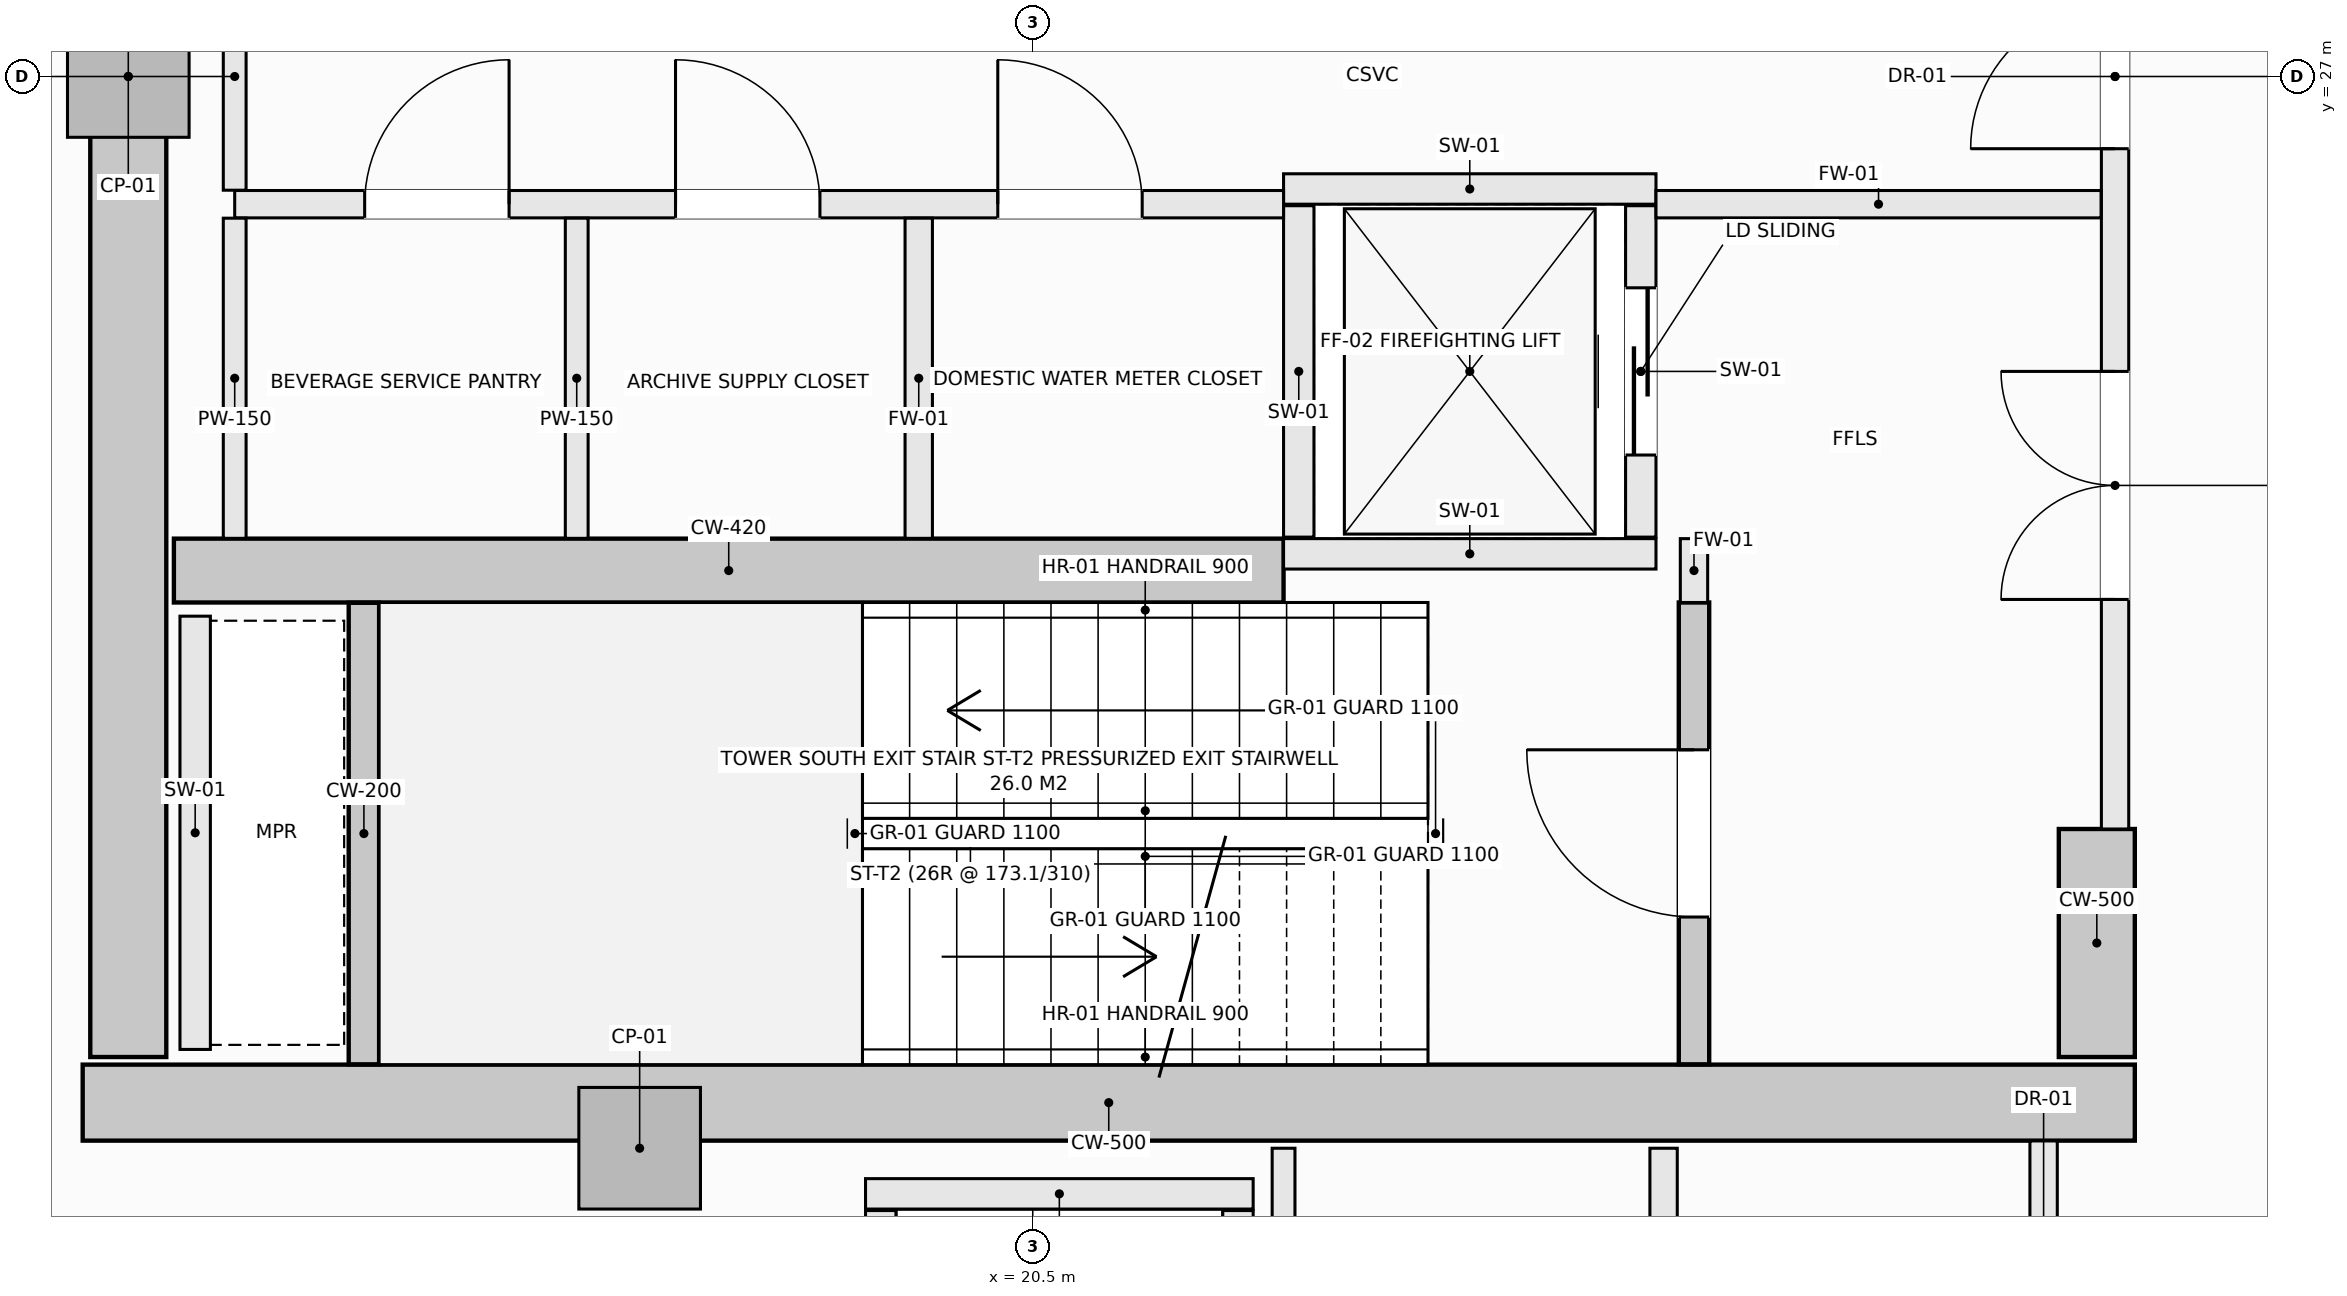
"""IFC4 building model, lengths in metres.
Left out: names, types, materials, properties, quantities, classifications, styles, units other than length and angle.
Written with IfcOpenShell. Run it as: python <this file> out.ifc"""

import sys

from ifc_helpers import new_model, si_unit, direction, frame, frame_2d, origin, origin_2d, place, context, subcontext, project, spatial, rectangle, extrude, element, fill, save


model = new_model("IFC4")
c1 = context("Model", 3, precision=1e-05, world=origin(), true_north=direction((0.0, 1.0)))
c2 = subcontext(c1, "Body", "Model", "MODEL_VIEW")
j1 = project(units=[si_unit("LENGTHUNIT", "METRE"), si_unit("PLANEANGLEUNIT", "RADIAN")], contexts=[c1])
p1 = place(None, origin())
s1 = spatial("IfcSite", under=j1, at=p1, CompositionType="ELEMENT")
p2 = place(p1, origin())
s2 = spatial("IfcBuilding", under=s1, at=p2, CompositionType="ELEMENT")
p3 = place(p2, frame((0.0, 0.0, 191.9)))
s3 = spatial("IfcBuildingStorey", under=s2, at=p3, CompositionType="ELEMENT", Elevation=191.9)
p4 = place(p3, frame((14.25, 20.25, -0.28), z_axis=(0.0, 0.0, 1.0), x_axis=(1.0, 0.0, 0.0)))
e1 = element("IfcWall", 1, at=p4, inside=s3, PredefinedType="SHEAR", context=c2, shape_type="SweptSolid", body=[
    extrude(rectangle(XDim=13.5, YDim=0.5, at=frame_2d((6.75, 0.0))), origin(), (0.0, 0.0, 1.0), 4.51),
])
p5 = place(p3, frame((14.55, 20.55, -0.28), z_axis=(0.0, 0.0, 1.0), x_axis=(0.0, 1.0, 0.0)))
e2 = element("IfcWall", 2, at=p5, inside=s3, PredefinedType="SHEAR", context=c2, shape_type="SweptSolid", body=[
    extrude(rectangle(XDim=12.9, YDim=0.5, at=frame_2d((6.45, 0.0))), origin(), (0.0, 0.0, 1.0), 4.51),
])
p6 = place(p3, frame((27.5, 20.55, -0.28), z_axis=(0.0, 0.0, 1.0), x_axis=(0.0, 1.0, 0.0)))
e3 = element("IfcWall", 3, at=p6, inside=s3, PredefinedType="SHEAR", context=c2, shape_type="SweptSolid", body=[
    extrude(rectangle(XDim=1.5, YDim=0.5, at=frame_2d((0.75, 0.0))), origin(), (0.0, 0.0, 1.0), 4.51),
])
p7 = place(p3, frame((14.85, 23.75, -0.28), z_axis=(0.0, 0.0, 1.0), x_axis=(1.0, 0.0, 0.0)))
e4 = element("IfcWall", 4, at=p7, inside=s3, PredefinedType="SHEAR", context=c2, shape_type="SweptSolid", body=[
    extrude(rectangle(XDim=7.3, YDim=0.42, at=frame_2d((3.65, 0.0))), origin(), (0.0, 0.0, 1.0), 4.51),
])
for number, where, z_axis, x_axis in (
    (5, (14.55, 27.0, -0.28), (0.0, 0.0, 1.0), (1.0, 0.0, 0.0)),
    (6, (17.914, 19.95, -0.28), (0.0, 0.0, 1.0), (1.0, 0.0, 0.0)),
):
    element("IfcColumn", number, at=place(p3, frame(where, z_axis=z_axis, x_axis=x_axis)), inside=s3, PredefinedType="PILASTER", context=c2, shape_type="SweptSolid", body=[
        extrude(rectangle(XDim=0.8, YDim=0.8, at=origin_2d()), origin(), (0.0, 0.0, 1.0), 4.51),
    ])
p8 = place(p3, frame((24.85, 20.502, -0.28), z_axis=(0.0, 0.0, 1.0), x_axis=(0.0, 1.0, 0.0)))
e7 = element("IfcWall", 7, at=p8, inside=s3, PredefinedType="SHEAR", context=c2, shape_type="SweptSolid", body=[
    extrude(rectangle(XDim=3.038, YDim=0.2, at=frame_2d((1.519, 0.0))), origin(), (0.0, 0.0, 1.0), 4.51),
])
p9 = place(p8, frame((0.969, 0.0, 0.28)))
e8 = element("IfcOpeningElement", 8, at=p9, cuts=e7, PredefinedType="OPENING", context=c2, shape_type="SweptSolid", body=[
    extrude(rectangle(XDim=1.1, YDim=2.15, at=frame_2d((0.55, 1.075))), frame((0.0, 0.11, 0.0), z_axis=(0.0, -1.0, 0.0), x_axis=(1.0, 0.0, 0.0)), (0.0, 0.0, 1.0), 0.22),
])
p10 = place(p3, frame((16.1, 20.502, -0.28), z_axis=(0.0, 0.0, 1.0), x_axis=(0.0, 1.0, 0.0)))
e9 = element("IfcWall", 9, at=p10, inside=s3, PredefinedType="SHEAR", context=c2, shape_type="SweptSolid", body=[
    extrude(rectangle(XDim=3.036, YDim=0.2, at=frame_2d((1.518, 0.0))), origin(), (0.0, 0.0, 1.0), 4.51),
])
for number, where, z_axis, x_axis in (
    (10, (22.15, 26.26, 0.0), (0.0, 0.0, 1.0), (1.0, 0.0, 0.0)),
    (11, (22.15, 23.86, 0.0), (0.0, 0.0, 1.0), (1.0, 0.0, 0.0)),
):
    element("IfcWall", number, at=place(p3, frame(where, z_axis=z_axis, x_axis=x_axis)), inside=s3, PredefinedType="SOLIDWALL", context=c2, shape_type="SweptSolid", body=[
        extrude(rectangle(XDim=2.45, YDim=0.2, at=frame_2d((1.225, 0.0))), origin(), (0.0, 0.0, 1.0), 4.23),
    ])
p11 = place(p3, frame((22.25, 23.97, 0.0), z_axis=(0.0, 0.0, 1.0), x_axis=(0.0, 1.0, 0.0)))
e12 = element("IfcWall", 12, at=p11, inside=s3, PredefinedType="SOLIDWALL", context=c2, shape_type="SweptSolid", body=[
    extrude(rectangle(XDim=2.18, YDim=0.2, at=frame_2d((1.09, 0.0))), origin(), (0.0, 0.0, 1.0), 4.23),
])
p12 = place(p3, frame((24.5, 23.97, 0.0), z_axis=(0.0, 0.0, 1.0), x_axis=(0.0, 1.0, 0.0)))
e13 = element("IfcWall", 13, at=p12, inside=s3, PredefinedType="SOLIDWALL", context=c2, shape_type="SweptSolid", body=[
    extrude(rectangle(XDim=2.18, YDim=0.2, at=frame_2d((1.09, 0.0))), origin(), (0.0, 0.0, 1.0), 4.23),
])
p13 = place(p12, frame((0.54, 0.0, 0.0)))
e14 = element("IfcOpeningElement", 14, at=p13, cuts=e13, PredefinedType="OPENING", context=c2, shape_type="SweptSolid", body=[
    extrude(rectangle(XDim=1.1, YDim=2.2, at=frame_2d((0.55, 1.1))), frame((0.0, 0.11, 0.0), z_axis=(0.0, -1.0, 0.0), x_axis=(1.0, 0.0, 0.0)), (0.0, 0.0, 1.0), 0.22),
])
p14 = place(p3, frame((19.4, 19.65, 0.0), z_axis=(0.0, 0.0, 1.0), x_axis=(1.0, 0.0, 0.0)))
e15 = element("IfcWall", 15, at=p14, inside=s3, PredefinedType="SOLIDWALL", context=c2, shape_type="SweptSolid", body=[
    extrude(rectangle(XDim=2.55, YDim=0.2, at=frame_2d((1.275, 0.0))), origin(), (0.0, 0.0, 1.0), 4.23),
])
for number, where, z_axis, x_axis in (
    (16, (19.5, 17.01, 0.0), (0.0, 0.0, 1.0), (0.0, 1.0, 0.0)),
    (17, (21.85, 17.01, 0.0), (0.0, 0.0, 1.0), (0.0, 1.0, 0.0)),
):
    element("IfcWall", number, at=place(p3, frame(where, z_axis=z_axis, x_axis=x_axis)), inside=s3, PredefinedType="SOLIDWALL", context=c2, shape_type="SweptSolid", body=[
        extrude(rectangle(XDim=2.53, YDim=0.2, at=frame_2d((1.265, 0.0))), origin(), (0.0, 0.0, 1.0), 4.23),
    ])
p15 = place(p3, frame((14.99, 20.6, 0.0), z_axis=(0.0, 0.0, 1.0), x_axis=(0.0, 1.0, 0.0)))
e18 = element("IfcWall", 18, at=p15, inside=s3, PredefinedType="SOLIDWALL", context=c2, shape_type="SweptSolid", body=[
    extrude(rectangle(XDim=2.85, YDim=0.2, at=frame_2d((1.425, 0.0))), origin(), (0.0, 0.0, 1.0), 4.23),
])
p16 = place(p3, frame((24.85, 23.54, 0.0), z_axis=(0.0, 0.0, 1.0), x_axis=(0.0, 1.0, 0.0)))
e19 = element("IfcWall", 19, at=p16, inside=s3, PredefinedType="SOLIDWALL", context=c2, shape_type="SweptSolid", body=[
    extrude(rectangle(XDim=0.42, YDim=0.18, at=frame_2d((0.21, 0.0))), origin(), (0.0, 0.0, 1.0), 4.23),
])
p17 = place(p3, frame((27.62, 22.05, 0.0), z_axis=(0.0, 0.0, 1.0), x_axis=(0.0, 1.0, 0.0)))
e20 = element("IfcWall", 20, at=p17, inside=s3, PredefinedType="SOLIDWALL", context=c2, shape_type="SweptSolid", body=[
    extrude(rectangle(XDim=9.9, YDim=0.18, at=frame_2d((4.95, 0.0))), origin(), (0.0, 0.0, 1.0), 3.322),
])
p18 = place(p17, frame((4.475, 0.0, 0.0)))
e21 = element("IfcOpeningElement", 21, at=p18, cuts=e20, PredefinedType="OPENING", context=c2, shape_type="SweptSolid", body=[
    extrude(rectangle(XDim=0.95, YDim=2.1, at=frame_2d((0.475, 1.05))), frame((0.0, 0.1, 0.0), z_axis=(0.0, -1.0, 0.0), x_axis=(1.0, 0.0, 0.0)), (0.0, 0.0, 1.0), 0.2),
])
p19 = place(p17, frame((6.89, 0.0, 0.0)))
e22 = element("IfcOpeningElement", 22, at=p19, cuts=e20, PredefinedType="OPENING", context=c2, shape_type="SweptSolid", body=[
    extrude(rectangle(XDim=1.5, YDim=2.2, at=frame_2d((0.75, 1.1))), frame((0.0, 0.1, 0.0), z_axis=(0.0, -1.0, 0.0), x_axis=(1.0, 0.0, 0.0)), (0.0, 0.0, 1.0), 0.2),
])
p20 = place(p17, frame((1.51, 0.0, 0.0)))
e23 = element("IfcOpeningElement", 23, at=p20, cuts=e20, PredefinedType="OPENING", context=c2, shape_type="SweptSolid", body=[
    extrude(rectangle(XDim=1.5, YDim=2.2, at=frame_2d((0.75, 1.1))), frame((0.0, 0.1, 0.0), z_axis=(0.0, -1.0, 0.0), x_axis=(1.0, 0.0, 0.0)), (0.0, 0.0, 1.0), 0.2),
])
p21 = place(p3, frame((15.25, 26.16, 0.0), z_axis=(0.0, 0.0, 1.0), x_axis=(1.0, 0.0, 0.0)))
e24 = element("IfcWall", 24, at=p21, inside=s3, PredefinedType="SOLIDWALL", context=c2, shape_type="SweptSolid", body=[
    extrude(rectangle(XDim=6.9, YDim=0.18, at=frame_2d((3.45, 0.0))), origin(), (0.0, 0.0, 1.0), 4.23),
])
p22 = place(p21, frame((5.02, 0.0, 0.0)))
e25 = element("IfcOpeningElement", 25, at=p22, cuts=e24, PredefinedType="OPENING", context=c2, shape_type="SweptSolid", body=[
    extrude(rectangle(XDim=0.95, YDim=2.1, at=frame_2d((0.475, 1.05))), frame((0.0, 0.1, 0.0), z_axis=(0.0, -1.0, 0.0), x_axis=(1.0, 0.0, 0.0)), (0.0, 0.0, 1.0), 0.2),
])
p23 = place(p21, frame((0.855, 0.0, 0.0)))
e26 = element("IfcOpeningElement", 26, at=p23, cuts=e24, PredefinedType="OPENING", context=c2, shape_type="SweptSolid", body=[
    extrude(rectangle(XDim=0.95, YDim=2.1, at=frame_2d((0.475, 1.05))), frame((0.0, 0.1, 0.0), z_axis=(0.0, -1.0, 0.0), x_axis=(1.0, 0.0, 0.0)), (0.0, 0.0, 1.0), 0.2),
])
p24 = place(p21, frame((2.9, 0.0, 0.0)))
e27 = element("IfcOpeningElement", 27, at=p24, cuts=e24, PredefinedType="OPENING", context=c2, shape_type="SweptSolid", body=[
    extrude(rectangle(XDim=0.95, YDim=2.1, at=frame_2d((0.475, 1.05))), frame((0.0, 0.1, 0.0), z_axis=(0.0, -1.0, 0.0), x_axis=(1.0, 0.0, 0.0)), (0.0, 0.0, 1.0), 0.2),
])
p25 = place(p3, frame((24.6, 26.16, 0.0), z_axis=(0.0, 0.0, 1.0), x_axis=(1.0, 0.0, 0.0)))
e28 = element("IfcWall", 28, at=p25, inside=s3, PredefinedType="SOLIDWALL", context=c2, shape_type="SweptSolid", body=[
    extrude(rectangle(XDim=2.928, YDim=0.18, at=frame_2d((1.464, 0.0))), origin(), (0.0, 0.0, 1.0), 4.23),
])
p26 = place(p3, frame((15.25, 23.962, 0.0), z_axis=(0.0, 0.0, 1.0), x_axis=(0.0, 1.0, 0.0)))
e29 = element("IfcWall", 29, at=p26, inside=s3, PredefinedType="PARTITIONING", context=c2, shape_type="SweptSolid", body=[
    extrude(rectangle(XDim=2.106, YDim=0.15, at=frame_2d((1.053, 0.0))), origin(), (0.0, 0.0, 1.0), 4.23),
])
p27 = place(p3, frame((15.25, 26.252, 0.0), z_axis=(0.0, 0.0, 1.0), x_axis=(0.0, 1.0, 0.0)))
e30 = element("IfcWall", 30, at=p27, inside=s3, PredefinedType="PARTITIONING", context=c2, shape_type="SweptSolid", body=[
    extrude(rectangle(XDim=1.496, YDim=0.15, at=frame_2d((0.748, 0.0))), origin(), (0.0, 0.0, 1.0), 4.23),
])
p28 = place(p3, frame((19.75, 23.962, 0.0), z_axis=(0.0, 0.0, 1.0), x_axis=(0.0, 1.0, 0.0)))
e31 = element("IfcWall", 31, at=p28, inside=s3, PredefinedType="SOLIDWALL", context=c2, shape_type="SweptSolid", body=[
    extrude(rectangle(XDim=2.106, YDim=0.18, at=frame_2d((1.053, 0.0))), origin(), (0.0, 0.0, 1.0), 4.23),
])
p29 = place(p3, frame((17.5, 23.962, 0.0), z_axis=(0.0, 0.0, 1.0), x_axis=(0.0, 1.0, 0.0)))
e32 = element("IfcWall", 32, at=p29, inside=s3, PredefinedType="PARTITIONING", context=c2, shape_type="SweptSolid", body=[
    extrude(rectangle(XDim=2.106, YDim=0.15, at=frame_2d((1.053, 0.0))), origin(), (0.0, 0.0, 1.0), 4.23),
])
p30 = place(p3, frame((22.15, 17.142, 0.0), z_axis=(0.0, 0.0, 1.0), x_axis=(0.0, 1.0, 0.0)))
e33 = element("IfcWall", 33, at=p30, inside=s3, PredefinedType="PARTITIONING", context=c2, shape_type="SweptSolid", body=[
    extrude(rectangle(XDim=2.808, YDim=0.15, at=frame_2d((1.404, 0.0))), origin(), (0.0, 0.0, 1.0), 4.23),
])
p31 = place(p3, frame((24.65, 17.142, 0.0), z_axis=(0.0, 0.0, 1.0), x_axis=(0.0, 1.0, 0.0)))
e34 = element("IfcWall", 34, at=p31, inside=s3, PredefinedType="SOLIDWALL", context=c2, shape_type="SweptSolid", body=[
    extrude(rectangle(XDim=2.808, YDim=0.18, at=frame_2d((1.404, 0.0))), origin(), (0.0, 0.0, 1.0), 4.23),
])
p32 = place(p3, frame((27.15, 17.142, 0.0), z_axis=(0.0, 0.0, 1.0), x_axis=(0.0, 1.0, 0.0)))
e35 = element("IfcWall", 35, at=p32, inside=s3, PredefinedType="SOLIDWALL", context=c2, shape_type="SweptSolid", body=[
    extrude(rectangle(XDim=2.856, YDim=0.18, at=frame_2d((1.428, 0.0))), origin(), (0.0, 0.0, 1.0), 4.23),
])
p33 = place(p32, frame((0.953, 0.0, 0.0)))
e36 = element("IfcOpeningElement", 36, at=p33, cuts=e35, PredefinedType="OPENING", context=c2, shape_type="SweptSolid", body=[
    extrude(rectangle(XDim=0.95, YDim=2.1, at=frame_2d((0.475, 1.05))), frame((0.0, 0.1, 0.0), z_axis=(0.0, -1.0, 0.0), x_axis=(1.0, 0.0, 0.0)), (0.0, 0.0, 1.0), 0.2),
])
p34 = place(p9, origin())
e37 = element("IfcDoor", 37, at=p34, inside=s3, OperationType="SINGLE_SWING_RIGHT", PredefinedType="DOOR", context=c2, shape_type="SweptSolid", body=[
    extrude(rectangle(XDim=1.1, YDim=2.15, at=frame_2d((0.55, 1.075))), frame((0.0, 0.025, 0.0), z_axis=(0.0, -1.0, 0.0), x_axis=(1.0, 0.0, 0.0)), (0.0, 0.0, 1.0), 0.05),
])
fill(e8, e37)
p35 = place(p13, origin())
e38 = element("IfcDoor", 38, at=p35, inside=s3, OperationType="SLIDING_TO_LEFT", PredefinedType="DOOR", context=c2, shape_type="SweptSolid", body=[
    extrude(rectangle(XDim=1.1, YDim=2.2, at=frame_2d((0.55, 1.1))), frame((0.0, 0.025, 0.0), z_axis=(0.0, -1.0, 0.0), x_axis=(1.0, 0.0, 0.0)), (0.0, 0.0, 1.0), 0.05),
])
fill(e14, e38)
p36 = place(p18, origin())
e39 = element("IfcDoor", 39, at=p36, inside=s3, OperationType="SINGLE_SWING_LEFT", PredefinedType="DOOR", context=c2, shape_type="SweptSolid", body=[
    extrude(rectangle(XDim=0.95, YDim=2.1, at=frame_2d((0.475, 1.05))), frame((0.0, 0.025, 0.0), z_axis=(0.0, -1.0, 0.0), x_axis=(1.0, 0.0, 0.0)), (0.0, 0.0, 1.0), 0.05),
])
fill(e21, e39)
p37 = place(p20, origin())
e40 = element("IfcDoor", 40, at=p37, inside=s3, OperationType="DOUBLE_DOOR_SINGLE_SWING", PredefinedType="DOOR", context=c2, shape_type="SweptSolid", body=[
    extrude(rectangle(XDim=1.5, YDim=2.2, at=frame_2d((0.75, 1.1))), frame((0.0, 0.025, 0.0), z_axis=(0.0, -1.0, 0.0), x_axis=(1.0, 0.0, 0.0)), (0.0, 0.0, 1.0), 0.05),
])
fill(e23, e40)
p38 = place(p22, origin())
e41 = element("IfcDoor", 41, at=p38, inside=s3, OperationType="SINGLE_SWING_LEFT", PredefinedType="DOOR", context=c2, shape_type="SweptSolid", body=[
    extrude(rectangle(XDim=0.95, YDim=2.1, at=frame_2d((0.475, 1.05))), frame((0.0, 0.025, 0.0), z_axis=(0.0, -1.0, 0.0), x_axis=(1.0, 0.0, 0.0)), (0.0, 0.0, 1.0), 0.05),
])
fill(e25, e41)
p39 = place(p23, origin())
e42 = element("IfcDoor", 42, at=p39, inside=s3, OperationType="SINGLE_SWING_RIGHT", PredefinedType="DOOR", context=c2, shape_type="SweptSolid", body=[
    extrude(rectangle(XDim=0.95, YDim=2.1, at=frame_2d((0.475, 1.05))), frame((0.0, 0.025, 0.0), z_axis=(0.0, -1.0, 0.0), x_axis=(1.0, 0.0, 0.0)), (0.0, 0.0, 1.0), 0.05),
])
fill(e26, e42)
p40 = place(p24, origin())
e43 = element("IfcDoor", 43, at=p40, inside=s3, OperationType="SINGLE_SWING_LEFT", PredefinedType="DOOR", context=c2, shape_type="SweptSolid", body=[
    extrude(rectangle(XDim=0.95, YDim=2.1, at=frame_2d((0.475, 1.05))), frame((0.0, 0.025, 0.0), z_axis=(0.0, -1.0, 0.0), x_axis=(1.0, 0.0, 0.0)), (0.0, 0.0, 1.0), 0.05),
])
fill(e27, e43)
save(model, sys.argv[1])
